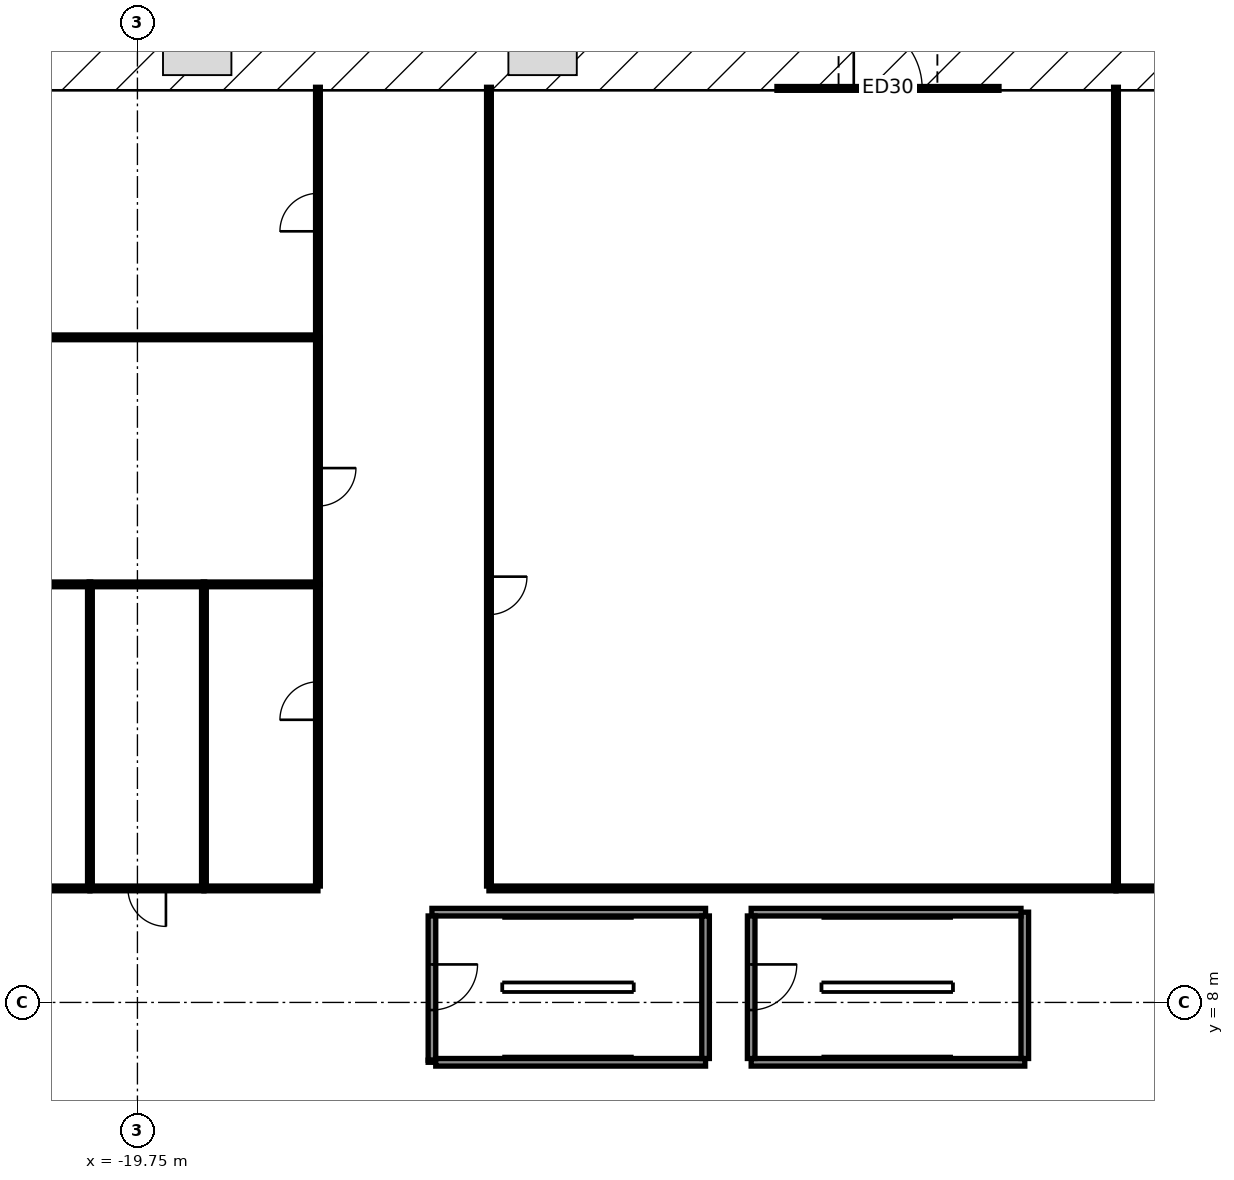
"""IFC4 building model, lengths in metres.
Left out: names, types, materials, properties, quantities, classifications, styles, units other than length and angle.
Written with IfcOpenShell. Run it as: python <this file> out.ifc"""

import sys

from ifc_helpers import new_model, si_unit, direction, frame, frame_2d, origin, origin_2d, place, context, subcontext, project, spatial, rectangle, hollow_rectangle, circle, extrude, element, fill, save


model = new_model("IFC4")
c1 = context("Model", 3, precision=1e-05, world=origin(), true_north=direction((0.0, 1.0)))
c2 = subcontext(c1, "Body", "Model", "MODEL_VIEW")
j1 = project(units=[si_unit("LENGTHUNIT", "METRE"), si_unit("PLANEANGLEUNIT", "RADIAN")], contexts=[c1])
p1 = place(None, origin())
s1 = spatial("IfcSite", under=j1, at=p1, CompositionType="ELEMENT")
p2 = place(p1, origin())
s2 = spatial("IfcBuilding", under=s1, at=p2, CompositionType="ELEMENT")
p3 = place(p2, frame((0.0, 0.0, 12.0)))
s3 = spatial("IfcBuildingStorey", under=s2, at=p3, CompositionType="ELEMENT", Elevation=12.0)
for number, where, z_axis, x_axis in (
    (1, (-21.0, 27.4, 0.0), (0.0, 0.0, 1.0), (1.0, 0.0, 0.0)),
    (2, (-4.2, 21.0, 0.0), (0.0, 0.0, 1.0), (1.0, 0.0, 0.0)),
    (3, (-4.2, 27.4, 0.0), (0.0, 0.0, 1.0), (1.0, 0.0, 0.0)),
    (4, (4.2, 21.0, 0.0), (0.0, 0.0, 1.0), (1.0, 0.0, 0.0)),
    (5, (4.2, 27.4, 0.0), (0.0, 0.0, 1.0), (1.0, 0.0, 0.0)),
):
    element("IfcColumn", number, at=place(p3, frame(where, z_axis=z_axis, x_axis=x_axis)), inside=s3, PredefinedType="COLUMN", context=c2, shape_type="SweptSolid", body=[
        extrude(circle(Radius=0.6, at=origin_2d()), origin(), (0.0, 0.0, 1.0), 4.5),
    ])
for number, where, z_axis, x_axis in (
    (6, (-11.317, 11.797, 0.0), (0.0, 0.0, 1.0), (0.866, 0.5, 0.0)),
    (7, (-20.539, 19.418, 0.0), (0.0, 0.0, 1.0), (0.5, 0.866, 0.0)),
):
    element("IfcColumn", number, at=place(p3, frame(where, z_axis=z_axis, x_axis=x_axis)), inside=s3, PredefinedType="COLUMN", context=c2, shape_type="SweptSolid", body=[
        extrude(hollow_rectangle(XDim=1.5, YDim=1.5, WallThickness=0.07, at=origin_2d()), origin(), (0.0, 0.0, 1.0), 4.5),
    ])
p4 = place(p3, frame((-2.921, 32.05, 0.0), z_axis=(0.0, 0.0, 1.0), x_axis=(1.0, 0.0, 0.0)))
e8 = element("IfcWall", 8, at=p4, inside=s3, PredefinedType="STANDARD", context=c2, shape_type="SweptSolid", body=[
    extrude(rectangle(XDim=5.842, YDim=0.1, at=frame_2d((2.921, 0.0))), origin(), (0.0, 0.0, 1.0), 4.5),
])
p5 = place(p4, frame((2.021, 0.0, 0.0)))
e9 = element("IfcOpeningElement", 9, at=p5, cuts=e8, PredefinedType="OPENING", context=c2, shape_type="SweptSolid", body=[
    extrude(rectangle(XDim=1.8, YDim=2.4, at=frame_2d((0.9, 1.2))), frame((0.0, 0.06, 0.0), z_axis=(0.0, -1.0, 0.0), x_axis=(1.0, 0.0, 0.0)), (0.0, 0.0, 1.0), 0.12),
])
p6 = place(p3, frame((-44.2, 8.0, 0.0), z_axis=(0.0, 0.0, 1.0), x_axis=(1.0, 0.0, 0.0)))
e10 = element("IfcWall", 10, at=p6, inside=s3, PredefinedType="SHEAR", context=c2, shape_type="SweptSolid", body=[
    extrude(rectangle(XDim=24.9, YDim=0.9, at=frame_2d((12.45, 0.0))), origin(), (0.0, 0.0, 1.0), 4.5),
])
p7 = place(p6, frame((10.5, 0.0, 0.0)))
e11 = element("IfcOpeningElement", 11, at=p7, cuts=e10, PredefinedType="OPENING", context=c2, shape_type="SweptSolid", body=[
    extrude(rectangle(XDim=1.1, YDim=2.1, at=frame_2d((0.55, 1.05))), frame((0.0, 0.46, 0.0), z_axis=(0.0, -1.0, 0.0), x_axis=(1.0, 0.0, 0.0)), (0.0, 0.0, 1.0), 0.92),
])
p8 = place(p6, frame((21.25, 0.0, 0.0)))
e12 = element("IfcOpeningElement", 12, at=p8, cuts=e10, PredefinedType="OPENING", context=c2, shape_type="SweptSolid", body=[
    extrude(rectangle(XDim=1.4, YDim=2.1, at=frame_2d((0.7, 1.05))), frame((0.0, 0.46, 0.0), z_axis=(0.0, -1.0, 0.0), x_axis=(1.0, 0.0, 0.0)), (0.0, 0.0, 1.0), 0.92),
])
p9 = place(p3, frame((-19.75, -8.0, 0.0), z_axis=(0.0, 0.0, 1.0), x_axis=(0.0, 1.0, 0.0)))
e13 = element("IfcWall", 13, at=p9, inside=s3, PredefinedType="SHEAR", context=c2, shape_type="SweptSolid", body=[
    extrude(rectangle(XDim=16.0, YDim=0.9, at=frame_2d((8.0, 0.0))), origin(), (0.0, 0.0, 1.0), 4.5),
])
p10 = place(p9, frame((7.1, 0.0, 0.0)))
e14 = element("IfcOpeningElement", 14, at=p10, cuts=e13, PredefinedType="OPENING", context=c2, shape_type="SweptSolid", body=[
    extrude(rectangle(XDim=1.8, YDim=2.1, at=frame_2d((0.9, 1.05))), frame((0.0, 0.46, 0.0), z_axis=(0.0, -1.0, 0.0), x_axis=(1.0, 0.0, 0.0)), (0.0, 0.0, 1.0), 0.92),
])
p11 = place(p3, frame((-4.8, 10.375, 0.0), z_axis=(0.0, 0.0, 1.0), x_axis=(-1.0, 0.0, 0.0)))
e15 = element("IfcWall", 15, at=p11, inside=s3, PredefinedType="SOLIDWALL", context=c2, shape_type="SweptSolid", body=[
    extrude(rectangle(XDim=7.2, YDim=0.2, at=frame_2d((3.6, 0.0))), origin(), (0.0, 0.0, 1.0), 4.2),
])
p12 = place(p3, frame((-12.0, 10.275, 0.0), z_axis=(0.0, 0.0, 1.0), x_axis=(0.0, -1.0, 0.0)))
e16 = element("IfcWall", 16, at=p12, inside=s3, PredefinedType="SOLIDWALL", context=c2, shape_type="SweptSolid", body=[
    extrude(rectangle(XDim=3.795, YDim=0.2, at=frame_2d((1.897, 0.0))), origin(), (0.0, 0.0, 1.0), 4.2),
])
p13 = place(p12, frame((1.275, 0.0, 0.0)))
e17 = element("IfcOpeningElement", 17, at=p13, cuts=e16, PredefinedType="OPENING", context=c2, shape_type="SweptSolid", body=[
    extrude(rectangle(XDim=1.2, YDim=2.1, at=frame_2d((0.6, 1.05))), frame((0.0, 0.11, 0.0), z_axis=(0.0, -1.0, 0.0), x_axis=(1.0, 0.0, 0.0)), (0.0, 0.0, 1.0), 0.22),
])
p14 = place(p3, frame((-12.0, 6.48, 0.0), z_axis=(0.0, 0.0, 1.0), x_axis=(0.0, -1.0, 0.0)))
e18 = element("IfcWall", 18, at=p14, inside=s3, PredefinedType="SOLIDWALL", context=c2, shape_type="SweptSolid", body=[
    extrude(rectangle(XDim=0.055, YDim=0.2, at=frame_2d((0.028, 0.0))), origin(), (0.0, 0.0, 1.0), 3.496),
])
p15 = place(p3, frame((-11.9, 6.425, 0.0), z_axis=(0.0, 0.0, 1.0), x_axis=(1.0, 0.0, 0.0)))
e19 = element("IfcWall", 19, at=p15, inside=s3, PredefinedType="SOLIDWALL", context=c2, shape_type="SweptSolid", body=[
    extrude(rectangle(XDim=7.1, YDim=0.2, at=frame_2d((3.55, 0.0))), origin(), (0.0, 0.0, 1.0), 4.2),
])
p16 = place(p3, frame((-4.8, 6.525, 0.0), z_axis=(0.0, 0.0, 1.0), x_axis=(0.0, 1.0, 0.0)))
e20 = element("IfcWall", 20, at=p16, inside=s3, PredefinedType="SOLIDWALL", context=c2, shape_type="SweptSolid", body=[
    extrude(rectangle(XDim=3.75, YDim=0.2, at=frame_2d((1.875, 0.0))), origin(), (0.0, 0.0, 1.0), 4.2),
])
p17 = place(p3, frame((-3.6, 6.425, 0.0), z_axis=(0.0, 0.0, 1.0), x_axis=(1.0, 0.0, 0.0)))
e21 = element("IfcWall", 21, at=p17, inside=s3, PredefinedType="SOLIDWALL", context=c2, shape_type="SweptSolid", body=[
    extrude(rectangle(XDim=7.2, YDim=0.2, at=frame_2d((3.6, 0.0))), origin(), (0.0, 0.0, 1.0), 4.2),
])
p18 = place(p3, frame((3.6, 6.525, 0.0), z_axis=(0.0, 0.0, 1.0), x_axis=(0.0, 1.0, 0.0)))
e22 = element("IfcWall", 22, at=p18, inside=s3, PredefinedType="SOLIDWALL", context=c2, shape_type="SweptSolid", body=[
    extrude(rectangle(XDim=3.85, YDim=0.2, at=frame_2d((1.925, 0.0))), origin(), (0.0, 0.0, 1.0), 4.2),
])
p19 = place(p3, frame((3.5, 10.375, 0.0), z_axis=(0.0, 0.0, 1.0), x_axis=(-1.0, 0.0, 0.0)))
e23 = element("IfcWall", 23, at=p19, inside=s3, PredefinedType="SOLIDWALL", context=c2, shape_type="SweptSolid", body=[
    extrude(rectangle(XDim=7.1, YDim=0.2, at=frame_2d((3.55, 0.0))), origin(), (0.0, 0.0, 1.0), 4.2),
])
p20 = place(p3, frame((-3.6, 10.275, 0.0), z_axis=(0.0, 0.0, 1.0), x_axis=(0.0, -1.0, 0.0)))
e24 = element("IfcWall", 24, at=p20, inside=s3, PredefinedType="SOLIDWALL", context=c2, shape_type="SweptSolid", body=[
    extrude(rectangle(XDim=3.75, YDim=0.2, at=frame_2d((1.875, 0.0))), origin(), (0.0, 0.0, 1.0), 4.2),
])
p21 = place(p20, frame((1.275, 0.0, 0.0)))
e25 = element("IfcOpeningElement", 25, at=p21, cuts=e24, PredefinedType="OPENING", context=c2, shape_type="SweptSolid", body=[
    extrude(rectangle(XDim=1.2, YDim=2.1, at=frame_2d((0.6, 1.05))), frame((0.0, 0.11, 0.0), z_axis=(0.0, -1.0, 0.0), x_axis=(1.0, 0.0, 0.0)), (0.0, 0.0, 1.0), 0.22),
])
p22 = place(p3, frame((-21.0, 11.0, 0.0), z_axis=(0.0, 0.0, 1.0), x_axis=(-1.0, 0.0, 0.0)))
e26 = element("IfcWall", 26, at=p22, inside=s3, PredefinedType="PARTITIONING", context=c2, shape_type="SweptSolid", body=[
    extrude(rectangle(XDim=3.0, YDim=0.125, at=frame_2d((1.5, 0.0))), origin(), (0.0, 0.0, 1.0), 4.2),
])
p23 = place(p22, frame((1.165, 0.0, 0.0)))
e27 = element("IfcOpeningElement", 27, at=p23, cuts=e26, PredefinedType="OPENING", context=c2, shape_type="SweptSolid", body=[
    extrude(rectangle(XDim=1.0, YDim=2.1, at=frame_2d((0.5, 1.05))), frame((0.0, 0.073, 0.0), z_axis=(0.0, -1.0, 0.0), x_axis=(1.0, 0.0, 0.0)), (0.0, 0.0, 1.0), 0.145),
])
p24 = place(p3, frame((-18.0, 11.0, 0.0), z_axis=(0.0, 0.0, 1.0), x_axis=(-1.0, 0.0, 0.0)))
e28 = element("IfcWall", 28, at=p24, inside=s3, PredefinedType="PARTITIONING", context=c2, shape_type="SweptSolid", body=[
    extrude(rectangle(XDim=3.0, YDim=0.125, at=frame_2d((1.5, 0.0))), origin(), (0.0, 0.0, 1.0), 3.647),
])
p25 = place(p24, frame((1.0, 0.0, 0.0)))
e29 = element("IfcOpeningElement", 29, at=p25, cuts=e28, PredefinedType="OPENING", context=c2, shape_type="SweptSolid", body=[
    extrude(rectangle(XDim=1.0, YDim=2.1, at=frame_2d((0.5, 1.05))), frame((0.0, 0.073, 0.0), z_axis=(0.0, -1.0, 0.0), x_axis=(1.0, 0.0, 0.0)), (0.0, 0.0, 1.0), 0.145),
])
p26 = place(p3, frame((-15.0, 11.0, 0.0), z_axis=(0.0, 0.0, 1.0), x_axis=(-1.0, 0.0, 0.0)))
e30 = element("IfcWall", 30, at=p26, inside=s3, PredefinedType="PARTITIONING", context=c2, shape_type="SweptSolid", body=[
    extrude(rectangle(XDim=3.0, YDim=0.125, at=frame_2d((1.5, 0.0))), origin(), (0.0, 0.0, 1.0), 4.2),
])
p27 = place(p3, frame((6.0, 11.0, 0.0), z_axis=(0.0, 0.0, 1.0), x_axis=(-1.0, 0.0, 0.0)))
e31 = element("IfcWall", 31, at=p27, inside=s3, PredefinedType="PARTITIONING", context=c2, shape_type="SweptSolid", body=[
    extrude(rectangle(XDim=16.5, YDim=0.125, at=frame_2d((8.25, 0.0))), origin(), (0.0, 0.0, 1.0), 2.68),
])
p28 = place(p3, frame((19.5, 11.0, 0.0), z_axis=(0.0, 0.0, 1.0), x_axis=(-1.0, 0.0, 0.0)))
e32 = element("IfcWall", 32, at=p28, inside=s3, PredefinedType="PARTITIONING", context=c2, shape_type="SweptSolid", body=[
    extrude(rectangle(XDim=13.5, YDim=0.125, at=frame_2d((6.75, 0.0))), origin(), (0.0, 0.0, 1.0), 3.496),
])
p29 = place(p28, frame((7.99, 0.0, 0.0)))
e33 = element("IfcOpeningElement", 33, at=p29, cuts=e32, PredefinedType="OPENING", context=c2, shape_type="SweptSolid", body=[
    extrude(rectangle(XDim=1.0, YDim=2.1, at=frame_2d((0.5, 1.05))), frame((0.0, 0.073, 0.0), z_axis=(0.0, -1.0, 0.0), x_axis=(1.0, 0.0, 0.0)), (0.0, 0.0, 1.0), 0.145),
])
p30 = place(p3, frame((-15.0, 19.0, 0.0), z_axis=(0.0, 0.0, 1.0), x_axis=(0.0, -1.0, 0.0)))
e34 = element("IfcWall", 34, at=p30, inside=s3, PredefinedType="PARTITIONING", context=c2, shape_type="SweptSolid", body=[
    extrude(rectangle(XDim=7.938, YDim=0.125, at=frame_2d((3.969, 0.0))), origin(), (0.0, 0.0, 1.0), 3.496),
])
p31 = place(p30, frame((2.563, 0.0, 0.0)))
e35 = element("IfcOpeningElement", 35, at=p31, cuts=e34, PredefinedType="OPENING", context=c2, shape_type="SweptSolid", body=[
    extrude(rectangle(XDim=1.0, YDim=2.1, at=frame_2d((0.5, 1.05))), frame((0.0, 0.073, 0.0), z_axis=(0.0, -1.0, 0.0), x_axis=(1.0, 0.0, 0.0)), (0.0, 0.0, 1.0), 0.145),
])
p32 = place(p3, frame((-15.0, 25.5, 0.0), z_axis=(0.0, 0.0, 1.0), x_axis=(0.0, -1.0, 0.0)))
e36 = element("IfcWall", 36, at=p32, inside=s3, PredefinedType="PARTITIONING", context=c2, shape_type="SweptSolid", body=[
    extrude(rectangle(XDim=6.5, YDim=0.125, at=frame_2d((3.25, 0.0))), origin(), (0.0, 0.0, 1.0), 4.2),
])
p33 = place(p32, frame((3.44, 0.0, 0.0)))
e37 = element("IfcOpeningElement", 37, at=p33, cuts=e36, PredefinedType="OPENING", context=c2, shape_type="SweptSolid", body=[
    extrude(rectangle(XDim=1.0, YDim=2.1, at=frame_2d((0.5, 1.05))), frame((0.0, 0.073, 0.0), z_axis=(0.0, -1.0, 0.0), x_axis=(1.0, 0.0, 0.0)), (0.0, 0.0, 1.0), 0.145),
])
p34 = place(p3, frame((-15.0, 32.08, 0.0), z_axis=(0.0, 0.0, 1.0), x_axis=(0.0, -1.0, 0.0)))
e38 = element("IfcWall", 38, at=p34, inside=s3, PredefinedType="PARTITIONING", context=c2, shape_type="SweptSolid", body=[
    extrude(rectangle(XDim=6.58, YDim=0.125, at=frame_2d((3.29, 0.0))), origin(), (0.0, 0.0, 1.0), 2.68),
])
p35 = place(p34, frame((2.79, 0.0, 0.0)))
e39 = element("IfcOpeningElement", 39, at=p35, cuts=e38, PredefinedType="OPENING", context=c2, shape_type="SweptSolid", body=[
    extrude(rectangle(XDim=1.0, YDim=2.1, at=frame_2d((0.5, 1.05))), frame((0.0, 0.073, 0.0), z_axis=(0.0, -1.0, 0.0), x_axis=(1.0, 0.0, 0.0)), (0.0, 0.0, 1.0), 0.145),
])
p36 = place(p3, frame((-10.5, 11.062, 0.0), z_axis=(0.0, 0.0, 1.0), x_axis=(0.0, 1.0, 0.0)))
e40 = element("IfcWall", 40, at=p36, inside=s3, PredefinedType="PARTITIONING", context=c2, shape_type="SweptSolid", body=[
    extrude(rectangle(XDim=21.018, YDim=0.125, at=frame_2d((10.509, 0.0))), origin(), (0.0, 0.0, 1.0), 2.68),
])
p37 = place(p36, frame((7.141, 0.0, 0.0)))
e41 = element("IfcOpeningElement", 41, at=p37, cuts=e40, PredefinedType="OPENING", context=c2, shape_type="SweptSolid", body=[
    extrude(rectangle(XDim=1.0, YDim=2.1, at=frame_2d((0.5, 1.05))), frame((0.0, 0.073, 0.0), z_axis=(0.0, -1.0, 0.0), x_axis=(1.0, 0.0, 0.0)), (0.0, 0.0, 1.0), 0.145),
])
p38 = place(p3, frame((-21.0, 11.062, 0.0), z_axis=(0.0, 0.0, 1.0), x_axis=(0.0, 1.0, 0.0)))
e42 = element("IfcWall", 42, at=p38, inside=s3, PredefinedType="PARTITIONING", context=c2, shape_type="SweptSolid", body=[
    extrude(rectangle(XDim=7.938, YDim=0.125, at=frame_2d((3.969, 0.0))), origin(), (0.0, 0.0, 1.0), 3.496),
])
p39 = place(p3, frame((-20.98, 19.0, 0.0), z_axis=(0.0, 0.0, 1.0), x_axis=(-1.0, 0.0, 0.0)))
e43 = element("IfcWall", 43, at=p39, inside=s3, PredefinedType="PARTITIONING", context=c2, shape_type="SweptSolid", body=[
    extrude(rectangle(XDim=2.958, YDim=0.125, at=frame_2d((1.479, 0.0))), origin(), (0.0, 0.0, 1.0), 4.2),
])
p40 = place(p3, frame((-18.0, 11.062, 0.0), z_axis=(0.0, 0.0, 1.0), x_axis=(0.0, 1.0, 0.0)))
e44 = element("IfcWall", 44, at=p40, inside=s3, PredefinedType="PARTITIONING", context=c2, shape_type="SweptSolid", body=[
    extrude(rectangle(XDim=7.938, YDim=0.125, at=frame_2d((3.969, 0.0))), origin(), (0.0, 0.0, 1.0), 3.496),
])
p41 = place(p3, frame((-17.98, 19.0, 0.0), z_axis=(0.0, 0.0, 1.0), x_axis=(-1.0, 0.0, 0.0)))
e45 = element("IfcWall", 45, at=p41, inside=s3, PredefinedType="PARTITIONING", context=c2, shape_type="SweptSolid", body=[
    extrude(rectangle(XDim=3.04, YDim=0.125, at=frame_2d((1.52, 0.0))), origin(), (0.0, 0.0, 1.0), 4.2),
])
p42 = place(p3, frame((-15.062, 19.0, 0.0), z_axis=(0.0, 0.0, 1.0), x_axis=(-1.0, 0.0, 0.0)))
e46 = element("IfcWall", 46, at=p42, inside=s3, PredefinedType="PARTITIONING", context=c2, shape_type="SweptSolid", body=[
    extrude(rectangle(XDim=2.958, YDim=0.125, at=frame_2d((1.479, 0.0))), origin(), (0.0, 0.0, 1.0), 4.2),
])
p43 = place(p3, frame((-15.062, 25.5, 0.0), z_axis=(0.0, 0.0, 1.0), x_axis=(-1.0, 0.0, 0.0)))
e47 = element("IfcWall", 47, at=p43, inside=s3, PredefinedType="PARTITIONING", context=c2, shape_type="SweptSolid", body=[
    extrude(rectangle(XDim=8.875, YDim=0.125, at=frame_2d((4.438, 0.0))), origin(), (0.0, 0.0, 1.0), 2.68),
])
p44 = place(p3, frame((6.0, 11.062, 0.0), z_axis=(0.0, 0.0, 1.0), x_axis=(0.0, 1.0, 0.0)))
e48 = element("IfcWall", 48, at=p44, inside=s3, PredefinedType="PARTITIONING", context=c2, shape_type="SweptSolid", body=[
    extrude(rectangle(XDim=21.018, YDim=0.125, at=frame_2d((10.509, 0.0))), origin(), (0.0, 0.0, 1.0), 2.68),
])
p45 = place(p5, origin())
e49 = element("IfcDoor", 49, at=p45, inside=s3, OperationType="SINGLE_SWING_LEFT", PredefinedType="DOOR", context=c2, shape_type="SweptSolid", body=[
    extrude(rectangle(XDim=1.8, YDim=2.4, at=frame_2d((0.9, 1.2))), frame((0.0, 0.025, 0.0), z_axis=(0.0, -1.0, 0.0), x_axis=(1.0, 0.0, 0.0)), (0.0, 0.0, 1.0), 0.05),
])
fill(e9, e49)
p46 = place(p8, origin())
e50 = element("IfcDoor", 50, at=p46, inside=s3, OperationType="DOUBLE_DOOR_SINGLE_SWING", PredefinedType="DOOR", context=c2, shape_type="SweptSolid", body=[
    extrude(rectangle(XDim=1.4, YDim=2.1, at=frame_2d((0.7, 1.05))), frame((0.0, -0.4, 0.0), z_axis=(0.0, -1.0, 0.0), x_axis=(1.0, 0.0, 0.0)), (0.0, 0.0, 1.0), 0.05),
])
fill(e12, e50)
p47 = place(p25, origin())
e51 = element("IfcDoor", 51, at=p47, inside=s3, OperationType="SINGLE_SWING_LEFT", PredefinedType="DOOR", context=c2, shape_type="SweptSolid", body=[
    extrude(rectangle(XDim=1.0, YDim=2.1, at=frame_2d((0.5, 1.05))), frame((0.0, 0.025, 0.0), z_axis=(0.0, -1.0, 0.0), x_axis=(1.0, 0.0, 0.0)), (0.0, 0.0, 1.0), 0.05),
])
fill(e29, e51)
p48 = place(p31, origin())
e52 = element("IfcDoor", 52, at=p48, inside=s3, OperationType="SINGLE_SWING_RIGHT", PredefinedType="DOOR", context=c2, shape_type="SweptSolid", body=[
    extrude(rectangle(XDim=1.0, YDim=2.1, at=frame_2d((0.5, 1.05))), frame((0.0, 0.025, 0.0), z_axis=(0.0, -1.0, 0.0), x_axis=(1.0, 0.0, 0.0)), (0.0, 0.0, 1.0), 0.05),
])
fill(e35, e52)
p49 = place(p33, origin())
e53 = element("IfcDoor", 53, at=p49, inside=s3, OperationType="SINGLE_SWING_LEFT", PredefinedType="DOOR", context=c2, shape_type="SweptSolid", body=[
    extrude(rectangle(XDim=1.0, YDim=2.1, at=frame_2d((0.5, 1.05))), frame((0.0, 0.025, 0.0), z_axis=(0.0, -1.0, 0.0), x_axis=(1.0, 0.0, 0.0)), (0.0, 0.0, 1.0), 0.05),
])
fill(e37, e53)
p50 = place(p35, origin())
e54 = element("IfcDoor", 54, at=p50, inside=s3, OperationType="SINGLE_SWING_RIGHT", PredefinedType="DOOR", context=c2, shape_type="SweptSolid", body=[
    extrude(rectangle(XDim=1.0, YDim=2.1, at=frame_2d((0.5, 1.05))), frame((0.0, 0.025, 0.0), z_axis=(0.0, -1.0, 0.0), x_axis=(1.0, 0.0, 0.0)), (0.0, 0.0, 1.0), 0.05),
])
fill(e39, e54)
p51 = place(p37, origin())
e55 = element("IfcDoor", 55, at=p51, inside=s3, OperationType="SINGLE_SWING_RIGHT", PredefinedType="DOOR", context=c2, shape_type="SweptSolid", body=[
    extrude(rectangle(XDim=1.0, YDim=2.1, at=frame_2d((0.5, 1.05))), frame((0.0, 0.025, 0.0), z_axis=(0.0, -1.0, 0.0), x_axis=(1.0, 0.0, 0.0)), (0.0, 0.0, 1.0), 0.05),
])
fill(e41, e55)
p52 = place(p13, frame((1.2, 0.0, 0.0), z_axis=(0.0, 0.0, 1.0), x_axis=(-1.0, 0.0, 0.0)))
e56 = element("IfcDoor", 56, at=p52, inside=s3, OperationType="SINGLE_SWING_LEFT", PredefinedType="DOOR", context=c2, shape_type="SweptSolid", body=[
    extrude(rectangle(XDim=1.2, YDim=2.1, at=frame_2d((0.6, 1.05))), frame((0.0, 0.025, 0.0), z_axis=(0.0, -1.0, 0.0), x_axis=(1.0, 0.0, 0.0)), (0.0, 0.0, 1.0), 0.05),
])
fill(e17, e56)
p53 = place(p21, frame((1.2, 0.0, 0.0), z_axis=(0.0, 0.0, 1.0), x_axis=(-1.0, 0.0, 0.0)))
e57 = element("IfcDoor", 57, at=p53, inside=s3, OperationType="SINGLE_SWING_LEFT", PredefinedType="DOOR", context=c2, shape_type="SweptSolid", body=[
    extrude(rectangle(XDim=1.2, YDim=2.1, at=frame_2d((0.6, 1.05))), frame((0.0, 0.025, 0.0), z_axis=(0.0, -1.0, 0.0), x_axis=(1.0, 0.0, 0.0)), (0.0, 0.0, 1.0), 0.05),
])
fill(e25, e57)
save(model, sys.argv[1])
